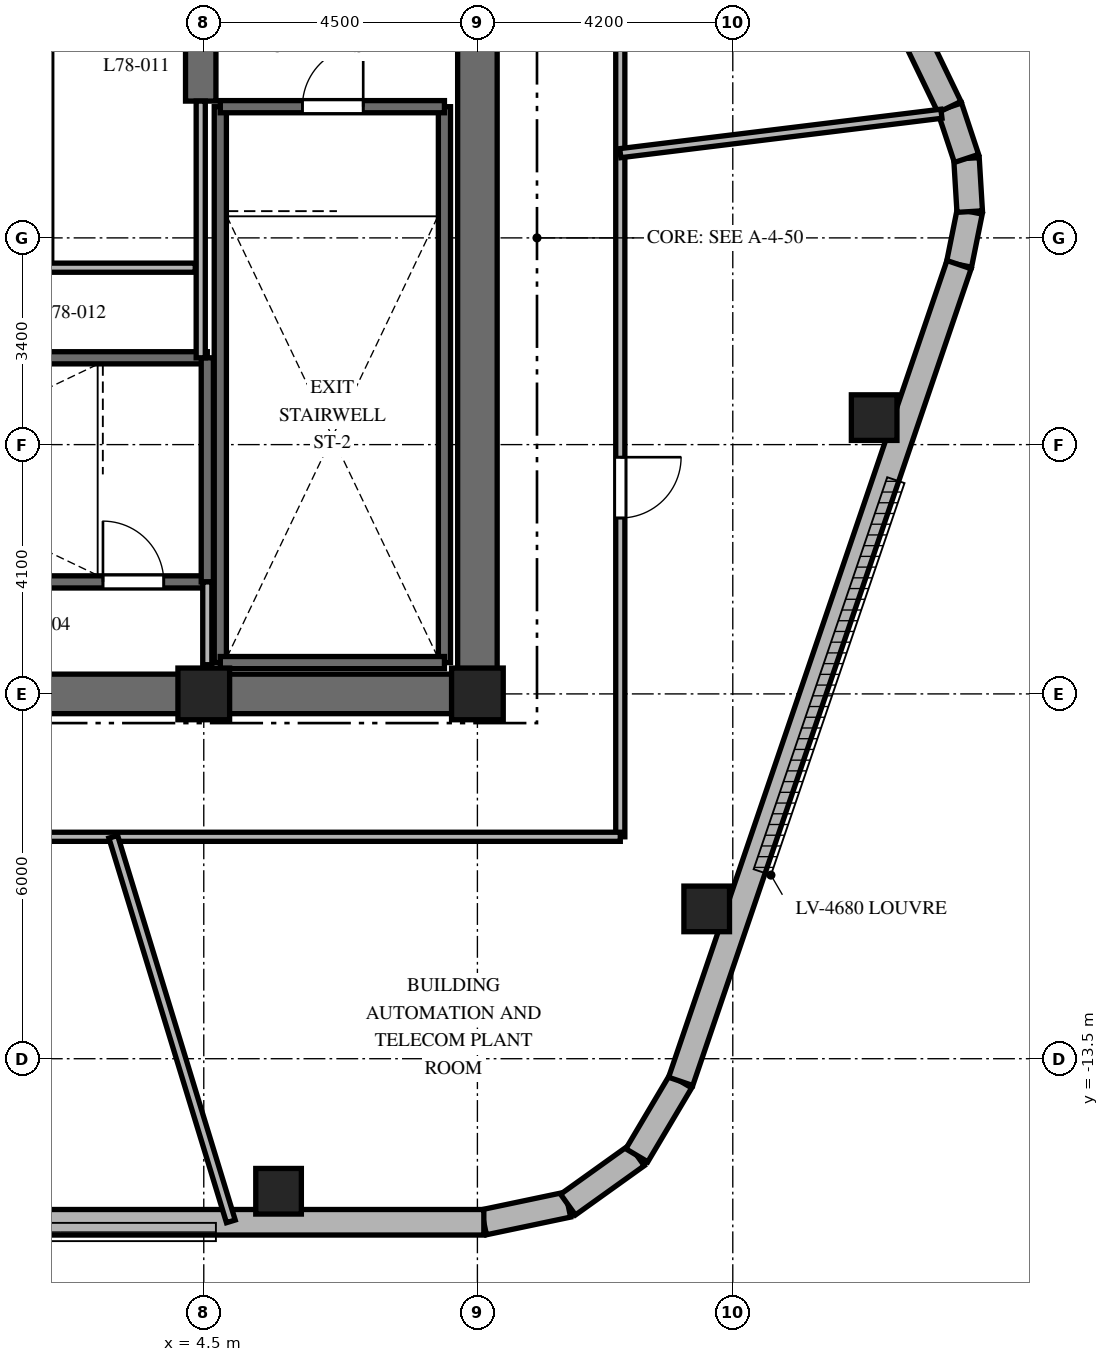
"""IFC4 building model, lengths in metres.
Left out: names, types, materials, properties, quantities, classifications, styles, units other than length and angle.
Written with IfcOpenShell. Run it as: python <this file> out.ifc"""

import sys

from ifc_helpers import new_model, si_unit, direction, frame, frame_2d, origin, origin_2d, place, context, subcontext, project, spatial, rectangle, extrude, element, fill, save


model = new_model("IFC4")
c1 = context("Model", 3, precision=1e-05, world=origin(), true_north=direction((0.0, 1.0)))
c2 = subcontext(c1, "Body", "Model", "MODEL_VIEW")
j1 = project(units=[si_unit("LENGTHUNIT", "METRE"), si_unit("PLANEANGLEUNIT", "RADIAN")], contexts=[c1])
p1 = place(None, origin())
s1 = spatial("IfcSite", under=j1, at=p1, CompositionType="ELEMENT")
p2 = place(p1, origin())
s2 = spatial("IfcBuilding", under=s1, at=p2, CompositionType="ELEMENT")
p3 = place(p2, frame((0.0, 0.0, 315.9)))
s3 = spatial("IfcBuildingStorey", under=s2, at=p3, CompositionType="ELEMENT", Elevation=315.9)
p4 = place(p3, frame((-9.325, -7.5, 0.0), z_axis=(0.0, 0.0, 1.0), x_axis=(1.0, 0.0, 0.0)))
e1 = element("IfcWall", 1, at=p4, inside=s3, PredefinedType="SHEAR", context=c2, shape_type="SweptSolid", body=[
    extrude(rectangle(XDim=18.65, YDim=0.65, at=frame_2d((9.325, 0.0))), origin(), (0.0, 0.0, 1.0), 5.5),
])
p5 = place(p4, frame((9.375, 0.0, 0.0)))
e2 = element("IfcOpeningElement", 2, at=p5, cuts=e1, PredefinedType="OPENING", context=c2, shape_type="SweptSolid", body=[
    extrude(rectangle(XDim=1.0, YDim=2.15, at=frame_2d((0.5, 1.075))), frame((0.0, 0.335, 0.0), z_axis=(0.0, -1.0, 0.0), x_axis=(1.0, 0.0, 0.0)), (0.0, 0.0, 1.0), 0.67),
])
p6 = place(p3, frame((9.0, -7.175, 0.0), z_axis=(0.0, 0.0, 1.0), x_axis=(0.0, 1.0, 0.0)))
e3 = element("IfcWall", 3, at=p6, inside=s3, PredefinedType="SHEAR", context=c2, shape_type="SweptSolid", body=[
    extrude(rectangle(XDim=14.35, YDim=0.65, at=frame_2d((7.175, 0.0))), origin(), (0.0, 0.0, 1.0), 5.5),
])
p7 = place(p6, frame((10.3, 0.0, 0.0)))
e4 = element("IfcOpeningElement", 4, at=p7, cuts=e3, PredefinedType="OPENING", context=c2, shape_type="SweptSolid", body=[
    extrude(rectangle(XDim=1.05, YDim=2.15, at=frame_2d((0.525, 1.075))), frame((0.0, 0.335, 0.0), z_axis=(0.0, -1.0, 0.0), x_axis=(1.0, 0.0, 0.0)), (0.0, 0.0, 1.0), 0.67),
])
p8 = place(p3, frame((4.45, 2.25, 0.0), z_axis=(0.0, 0.0, 1.0), x_axis=(0.0, 1.0, 0.0)))
e5 = element("IfcWall", 5, at=p8, inside=s3, PredefinedType="SHEAR", context=c2, shape_type="SweptSolid", body=[
    extrude(rectangle(XDim=4.925, YDim=0.5, at=frame_2d((2.462, 0.0))), origin(), (0.0, 0.0, 1.0), 5.5),
])
for number, where, z_axis, x_axis in (
    (6, (4.772, -6.985, 0.0), (0.0, 0.0, 1.0), (0.0, 1.0, 0.0)),
    (7, (8.458, -6.985, 0.0), (0.0, 0.0, 1.0), (0.0, 1.0, 0.0)),
):
    element("IfcWall", number, at=place(p3, frame(where, z_axis=z_axis, x_axis=x_axis)), inside=s3, PredefinedType="SHEAR", context=c2, shape_type="SweptSolid", body=[
        extrude(rectangle(XDim=9.143, YDim=0.2, at=frame_2d((4.572, 0.0))), origin(), (0.0, 0.0, 1.0), 5.5),
    ])
p9 = place(p3, frame((4.772, -6.985, 0.0), z_axis=(0.0, 0.0, 1.0), x_axis=(1.0, 0.0, 0.0)))
e8 = element("IfcWall", 8, at=p9, inside=s3, PredefinedType="SHEAR", context=c2, shape_type="SweptSolid", body=[
    extrude(rectangle(XDim=3.686, YDim=0.2, at=frame_2d((1.843, 0.0))), origin(), (0.0, 0.0, 1.0), 5.5),
])
p10 = place(p3, frame((4.772, 2.158, 0.0), z_axis=(0.0, 0.0, 1.0), x_axis=(1.0, 0.0, 0.0)))
e9 = element("IfcWall", 9, at=p10, inside=s3, PredefinedType="SHEAR", context=c2, shape_type="SweptSolid", body=[
    extrude(rectangle(XDim=3.686, YDim=0.2, at=frame_2d((1.843, 0.0))), origin(), (0.0, 0.0, 1.0), 5.5),
])
p11 = place(p10, frame((1.35, 0.0, 0.0)))
e10 = element("IfcOpeningElement", 10, at=p11, cuts=e9, PredefinedType="OPENING", context=c2, shape_type="SweptSolid", body=[
    extrude(rectangle(XDim=1.0, YDim=2.15, at=frame_2d((0.5, 1.075))), frame((0.0, 0.11, 0.0), z_axis=(0.0, -1.0, 0.0), x_axis=(1.0, 0.0, 0.0)), (0.0, 0.0, 1.0), 0.22),
])
p12 = place(p3, frame((-4.608, -5.658, 0.0), z_axis=(0.0, 0.0, 1.0), x_axis=(1.0, 0.0, 0.0)))
e11 = element("IfcWall", 11, at=p12, inside=s3, PredefinedType="SHEAR", context=c2, shape_type="SweptSolid", body=[
    extrude(rectangle(XDim=9.166, YDim=0.2, at=frame_2d((4.583, 0.0))), origin(), (0.0, 0.0, 1.0), 5.5),
])
p13 = place(p12, frame((7.45, 0.0, 0.0)))
e12 = element("IfcOpeningElement", 12, at=p13, cuts=e11, PredefinedType="OPENING", context=c2, shape_type="SweptSolid", body=[
    extrude(rectangle(XDim=1.0, YDim=2.15, at=frame_2d((0.5, 1.075))), frame((0.0, 0.11, 0.0), z_axis=(0.0, -1.0, 0.0), x_axis=(1.0, 0.0, 0.0)), (0.0, 0.0, 1.0), 0.22),
])
p14 = place(p3, frame((-4.608, -1.972, 0.0), z_axis=(0.0, 0.0, 1.0), x_axis=(1.0, 0.0, 0.0)))
e13 = element("IfcWall", 13, at=p14, inside=s3, PredefinedType="SHEAR", context=c2, shape_type="SweptSolid", body=[
    extrude(rectangle(XDim=9.166, YDim=0.2, at=frame_2d((4.583, 0.0))), origin(), (0.0, 0.0, 1.0), 5.5),
])
p15 = place(p3, frame((4.558, -5.658, 0.0), z_axis=(0.0, 0.0, 1.0), x_axis=(0.0, 1.0, 0.0)))
e14 = element("IfcWall", 14, at=p15, inside=s3, PredefinedType="SHEAR", context=c2, shape_type="SweptSolid", body=[
    extrude(rectangle(XDim=3.686, YDim=0.2, at=frame_2d((1.843, 0.0))), origin(), (0.0, 0.0, 1.0), 5.5),
])
for number, where, z_axis, x_axis in (
    (15, (4.5, -7.5, 0.0), (0.0, 0.0, 1.0), (1.0, 0.0, 0.0)),
    (16, (9.0, -7.5, 0.0), (0.0, 0.0, 1.0), (1.0, 0.0, 0.0)),
):
    element("IfcColumn", number, at=place(p3, frame(where, z_axis=z_axis, x_axis=x_axis)), inside=s3, PredefinedType="COLUMN", context=c2, shape_type="SweptSolid", body=[
        extrude(rectangle(XDim=0.85, YDim=0.85, at=origin_2d()), origin(), (0.0, 0.0, 1.0), 5.5),
    ])
for number, where, z_axis, x_axis in (
    (17, (5.73, -15.68, 0.0), (0.0, 0.0, 1.0), (1.0, 0.0, 0.0)),
    (18, (12.771, -11.036, 0.0), (0.0, 0.0, 1.0), (1.0, 0.0, 0.0)),
    (19, (15.525, -2.956, 0.0), (0.0, 0.0, 1.0), (1.0, 0.0, 0.0)),
):
    element("IfcColumn", number, at=place(p3, frame(where, z_axis=z_axis, x_axis=x_axis)), inside=s3, PredefinedType="COLUMN", context=c2, shape_type="SweptSolid", body=[
        extrude(rectangle(XDim=0.75, YDim=0.75, at=origin_2d()), origin(), (0.0, 0.0, 1.0), 5.5),
    ])
p16 = place(p3, frame((9.106, -16.19, 0.0), z_axis=(0.0, 0.0, 1.0), x_axis=(0.978670507127, 0.205436215114, 0.0)))
e20 = element("IfcWall", 20, at=p16, inside=s3, PredefinedType="SOLIDWALL", context=c2, shape_type="SweptSolid", body=[
    extrude(rectangle(XDim=1.414, YDim=0.42, at=frame_2d((0.707, 0.0))), origin(), (0.0, 0.0, 1.0), 5.18),
])
p17 = place(p3, frame((10.49, -15.899, 0.0), z_axis=(0.0, 0.0, 1.0), x_axis=(0.813104912719, 0.58211717112, 0.0)))
e21 = element("IfcWall", 21, at=p17, inside=s3, PredefinedType="SOLIDWALL", context=c2, shape_type="SweptSolid", body=[
    extrude(rectangle(XDim=1.392, YDim=0.42, at=frame_2d((0.696, 0.0))), origin(), (0.0, 0.0, 1.0), 5.18),
])
p18 = place(p3, frame((11.622, -15.089, 0.0), z_axis=(0.0, 0.0, 1.0), x_axis=(0.510403153597, 0.859935242212, 0.0)))
e22 = element("IfcWall", 22, at=p18, inside=s3, PredefinedType="SOLIDWALL", context=c2, shape_type="SweptSolid", body=[
    extrude(rectangle(XDim=1.414, YDim=0.42, at=frame_2d((0.707, 0.0))), origin(), (0.0, 0.0, 1.0), 5.18),
])
p19 = place(p3, frame((16.921, -0.44, 0.0), z_axis=(0.0, 0.0, 1.0), x_axis=(0.197170749138, 0.980369162961, 0.0)))
e23 = element("IfcWall", 23, at=p19, inside=s3, PredefinedType="SOLIDWALL", context=c2, shape_type="SweptSolid", body=[
    extrude(rectangle(XDim=0.89, YDim=0.42, at=frame_2d((0.445, 0.0))), origin(), (0.0, 0.0, 1.0), 5.18),
])
p20 = place(p3, frame((17.096, 0.433, 0.0), z_axis=(0.0, 0.0, 1.0), x_axis=(-0.060469820114, 0.998170026025, 0.0)))
e24 = element("IfcWall", 24, at=p20, inside=s3, PredefinedType="SOLIDWALL", context=c2, shape_type="SweptSolid", body=[
    extrude(rectangle(XDim=0.876, YDim=0.42, at=frame_2d((0.438, 0.0))), origin(), (0.0, 0.0, 1.0), 5.18),
])
p21 = place(p3, frame((17.043, 1.307, 0.0), z_axis=(0.0, 0.0, 1.0), x_axis=(-0.314581701602, 0.949230400386, 0.0)))
e25 = element("IfcWall", 25, at=p21, inside=s3, PredefinedType="SOLIDWALL", context=c2, shape_type="SweptSolid", body=[
    extrude(rectangle(XDim=0.89, YDim=0.42, at=frame_2d((0.445, 0.0))), origin(), (0.0, 0.0, 1.0), 5.18),
])
p22 = place(p3, frame((-7.84, -16.19, 0.0), z_axis=(0.0, 0.0, 1.0), x_axis=(1.0, 0.0, 0.0)))
e26 = element("IfcWall", 26, at=p22, inside=s3, PredefinedType="SOLIDWALL", context=c2, shape_type="SweptSolid", body=[
    extrude(rectangle(XDim=16.946, YDim=0.42, at=frame_2d((8.473, 0.0))), origin(), (0.0, 0.0, 1.0), 5.18),
])
p23 = place(p3, frame((12.344, -13.873, 0.0), z_axis=(0.0, 0.0, 1.0), x_axis=(0.322553427155, 0.946551259378, 0.0)))
e27 = element("IfcWall", 27, at=p23, inside=s3, PredefinedType="SOLIDWALL", context=c2, shape_type="SweptSolid", body=[
    extrude(rectangle(XDim=14.191, YDim=0.42, at=frame_2d((7.096, 0.0))), origin(), (0.0, 0.0, 1.0), 5.18),
])
p24 = place(p3, frame((16.763, 2.152, 0.0), z_axis=(0.0, 0.0, 1.0), x_axis=(-0.434664735238, 0.900592342817, 0.0)))
e28 = element("IfcWall", 28, at=p24, inside=s3, PredefinedType="SOLIDWALL", context=c2, shape_type="SweptSolid", body=[
    extrude(rectangle(XDim=13.44, YDim=0.42, at=frame_2d((6.72, 0.0))), origin(), (0.0, 0.0, 1.0), 5.18),
])
p25 = place(p3, frame((4.558, -7.02, 0.0), z_axis=(0.0, 0.0, 1.0), x_axis=(0.0, 1.0, 0.0)))
e29 = element("IfcWall", 29, at=p25, inside=s3, PredefinedType="PARTITIONING", context=c2, shape_type="SweptSolid", body=[
    extrude(rectangle(XDim=1.362, YDim=0.15, at=frame_2d((0.681, 0.0))), origin(), (0.0, 0.0, 1.0), 5.18),
])
p26 = place(p3, frame((4.45, -1.972, 0.0), z_axis=(0.0, 0.0, 1.0), x_axis=(0.0, 1.0, 0.0)))
e30 = element("IfcWall", 30, at=p26, inside=s3, PredefinedType="PARTITIONING", context=c2, shape_type="SweptSolid", body=[
    extrude(rectangle(XDim=4.222, YDim=0.15, at=frame_2d((2.111, 0.0))), origin(), (0.0, 0.0, 1.0), 5.18),
])
p27 = place(p3, frame((-4.36, -0.49, 0.0), z_axis=(0.0, 0.0, 1.0), x_axis=(1.0, 0.0, 0.0)))
e31 = element("IfcWall", 31, at=p27, inside=s3, PredefinedType="PARTITIONING", context=c2, shape_type="SweptSolid", body=[
    extrude(rectangle(XDim=8.72, YDim=0.15, at=frame_2d((4.36, 0.0))), origin(), (0.0, 0.0, 1.0), 5.18),
])
p28 = place(p27, frame((3.86, 0.0, 0.0)))
e32 = element("IfcOpeningElement", 32, at=p28, cuts=e31, PredefinedType="OPENING", context=c2, shape_type="SweptSolid", body=[
    extrude(rectangle(XDim=0.9, YDim=2.03, at=frame_2d((0.45, 1.015))), frame((0.0, 0.085, 0.0), z_axis=(0.0, -1.0, 0.0), x_axis=(1.0, 0.0, 0.0)), (0.0, 0.0, 1.0), 0.17),
])
p29 = place(p3, frame((11.35, 9.85, 0.0), z_axis=(0.0, 0.0, 1.0), x_axis=(0.0, -1.0, 0.0)))
e33 = element("IfcWall", 33, at=p29, inside=s3, PredefinedType="PARTITIONING", context=c2, shape_type="SweptSolid", body=[
    extrude(rectangle(XDim=19.7, YDim=0.15, at=frame_2d((9.85, 0.0))), origin(), (0.0, 0.0, 1.0), 4.67),
])
p30 = place(p29, frame((13.457, 0.0, 0.0)))
e34 = element("IfcOpeningElement", 34, at=p30, cuts=e33, PredefinedType="OPENING", context=c2, shape_type="SweptSolid", body=[
    extrude(rectangle(XDim=1.0, YDim=2.15, at=frame_2d((0.5, 1.075))), frame((0.0, 0.085, 0.0), z_axis=(0.0, -1.0, 0.0), x_axis=(1.0, 0.0, 0.0)), (0.0, 0.0, 1.0), 0.17),
])
p31 = place(p3, frame((11.35, -9.85, 0.0), z_axis=(0.0, 0.0, 1.0), x_axis=(-1.0, 0.0, 0.0)))
e35 = element("IfcWall", 35, at=p31, inside=s3, PredefinedType="PARTITIONING", context=c2, shape_type="SweptSolid", body=[
    extrude(rectangle(XDim=22.7, YDim=0.15, at=frame_2d((11.35, 0.0))), origin(), (0.0, 0.0, 1.0), 4.67),
])
p32 = place(p31, frame((14.894, 0.0, 0.0)))
e36 = element("IfcOpeningElement", 36, at=p32, cuts=e35, PredefinedType="OPENING", context=c2, shape_type="SweptSolid", body=[
    extrude(rectangle(XDim=1.0, YDim=2.15, at=frame_2d((0.5, 1.075))), frame((0.0, 0.085, 0.0), z_axis=(0.0, -1.0, 0.0), x_axis=(1.0, 0.0, 0.0)), (0.0, 0.0, 1.0), 0.17),
])
p33 = place(p3, frame((11.35, 1.394, 0.0), z_axis=(0.0, 0.0, 1.0), x_axis=(0.992546571341, 0.121865925179, 0.0)))
e37 = element("IfcWall", 37, at=p33, inside=s3, PredefinedType="PARTITIONING", context=c2, shape_type="SweptSolid", body=[
    extrude(rectangle(XDim=5.321, YDim=0.15, at=frame_2d((2.66, 0.0))), origin(), (0.0, 0.0, 1.0), 4.52),
])
p34 = place(p3, frame((3.011, -9.85, 0.0), z_axis=(0.0, 0.0, 1.0), x_axis=(0.292386397132, -0.956300263919, 0.0)))
e38 = element("IfcWall", 38, at=p34, inside=s3, PredefinedType="PARTITIONING", context=c2, shape_type="SweptSolid", body=[
    extrude(rectangle(XDim=6.614, YDim=0.15, at=frame_2d((3.307, 0.0))), origin(), (0.0, 0.0, 1.0), 4.52),
])
p35 = place(p11, origin())
e39 = element("IfcDoor", 39, at=p35, inside=s3, OperationType="SINGLE_SWING_RIGHT", PredefinedType="DOOR", context=c2, shape_type="SweptSolid", body=[
    extrude(rectangle(XDim=1.0, YDim=2.15, at=frame_2d((0.5, 1.075))), frame((0.0, 0.025, 0.0), z_axis=(0.0, -1.0, 0.0), x_axis=(1.0, 0.0, 0.0)), (0.0, 0.0, 1.0), 0.05),
])
fill(e10, e39)
p36 = place(p13, origin())
e40 = element("IfcDoor", 40, at=p36, inside=s3, OperationType="SINGLE_SWING_LEFT", PredefinedType="DOOR", context=c2, shape_type="SweptSolid", body=[
    extrude(rectangle(XDim=1.0, YDim=2.15, at=frame_2d((0.5, 1.075))), frame((0.0, 0.025, 0.0), z_axis=(0.0, -1.0, 0.0), x_axis=(1.0, 0.0, 0.0)), (0.0, 0.0, 1.0), 0.05),
])
fill(e12, e40)
p37 = place(p30, origin())
e41 = element("IfcDoor", 41, at=p37, inside=s3, OperationType="SINGLE_SWING_LEFT", PredefinedType="DOOR", context=c2, shape_type="SweptSolid", body=[
    extrude(rectangle(XDim=1.0, YDim=2.15, at=frame_2d((0.5, 1.075))), frame((0.0, 0.025, 0.0), z_axis=(0.0, -1.0, 0.0), x_axis=(1.0, 0.0, 0.0)), (0.0, 0.0, 1.0), 0.05),
])
fill(e34, e41)
save(model, sys.argv[1])
